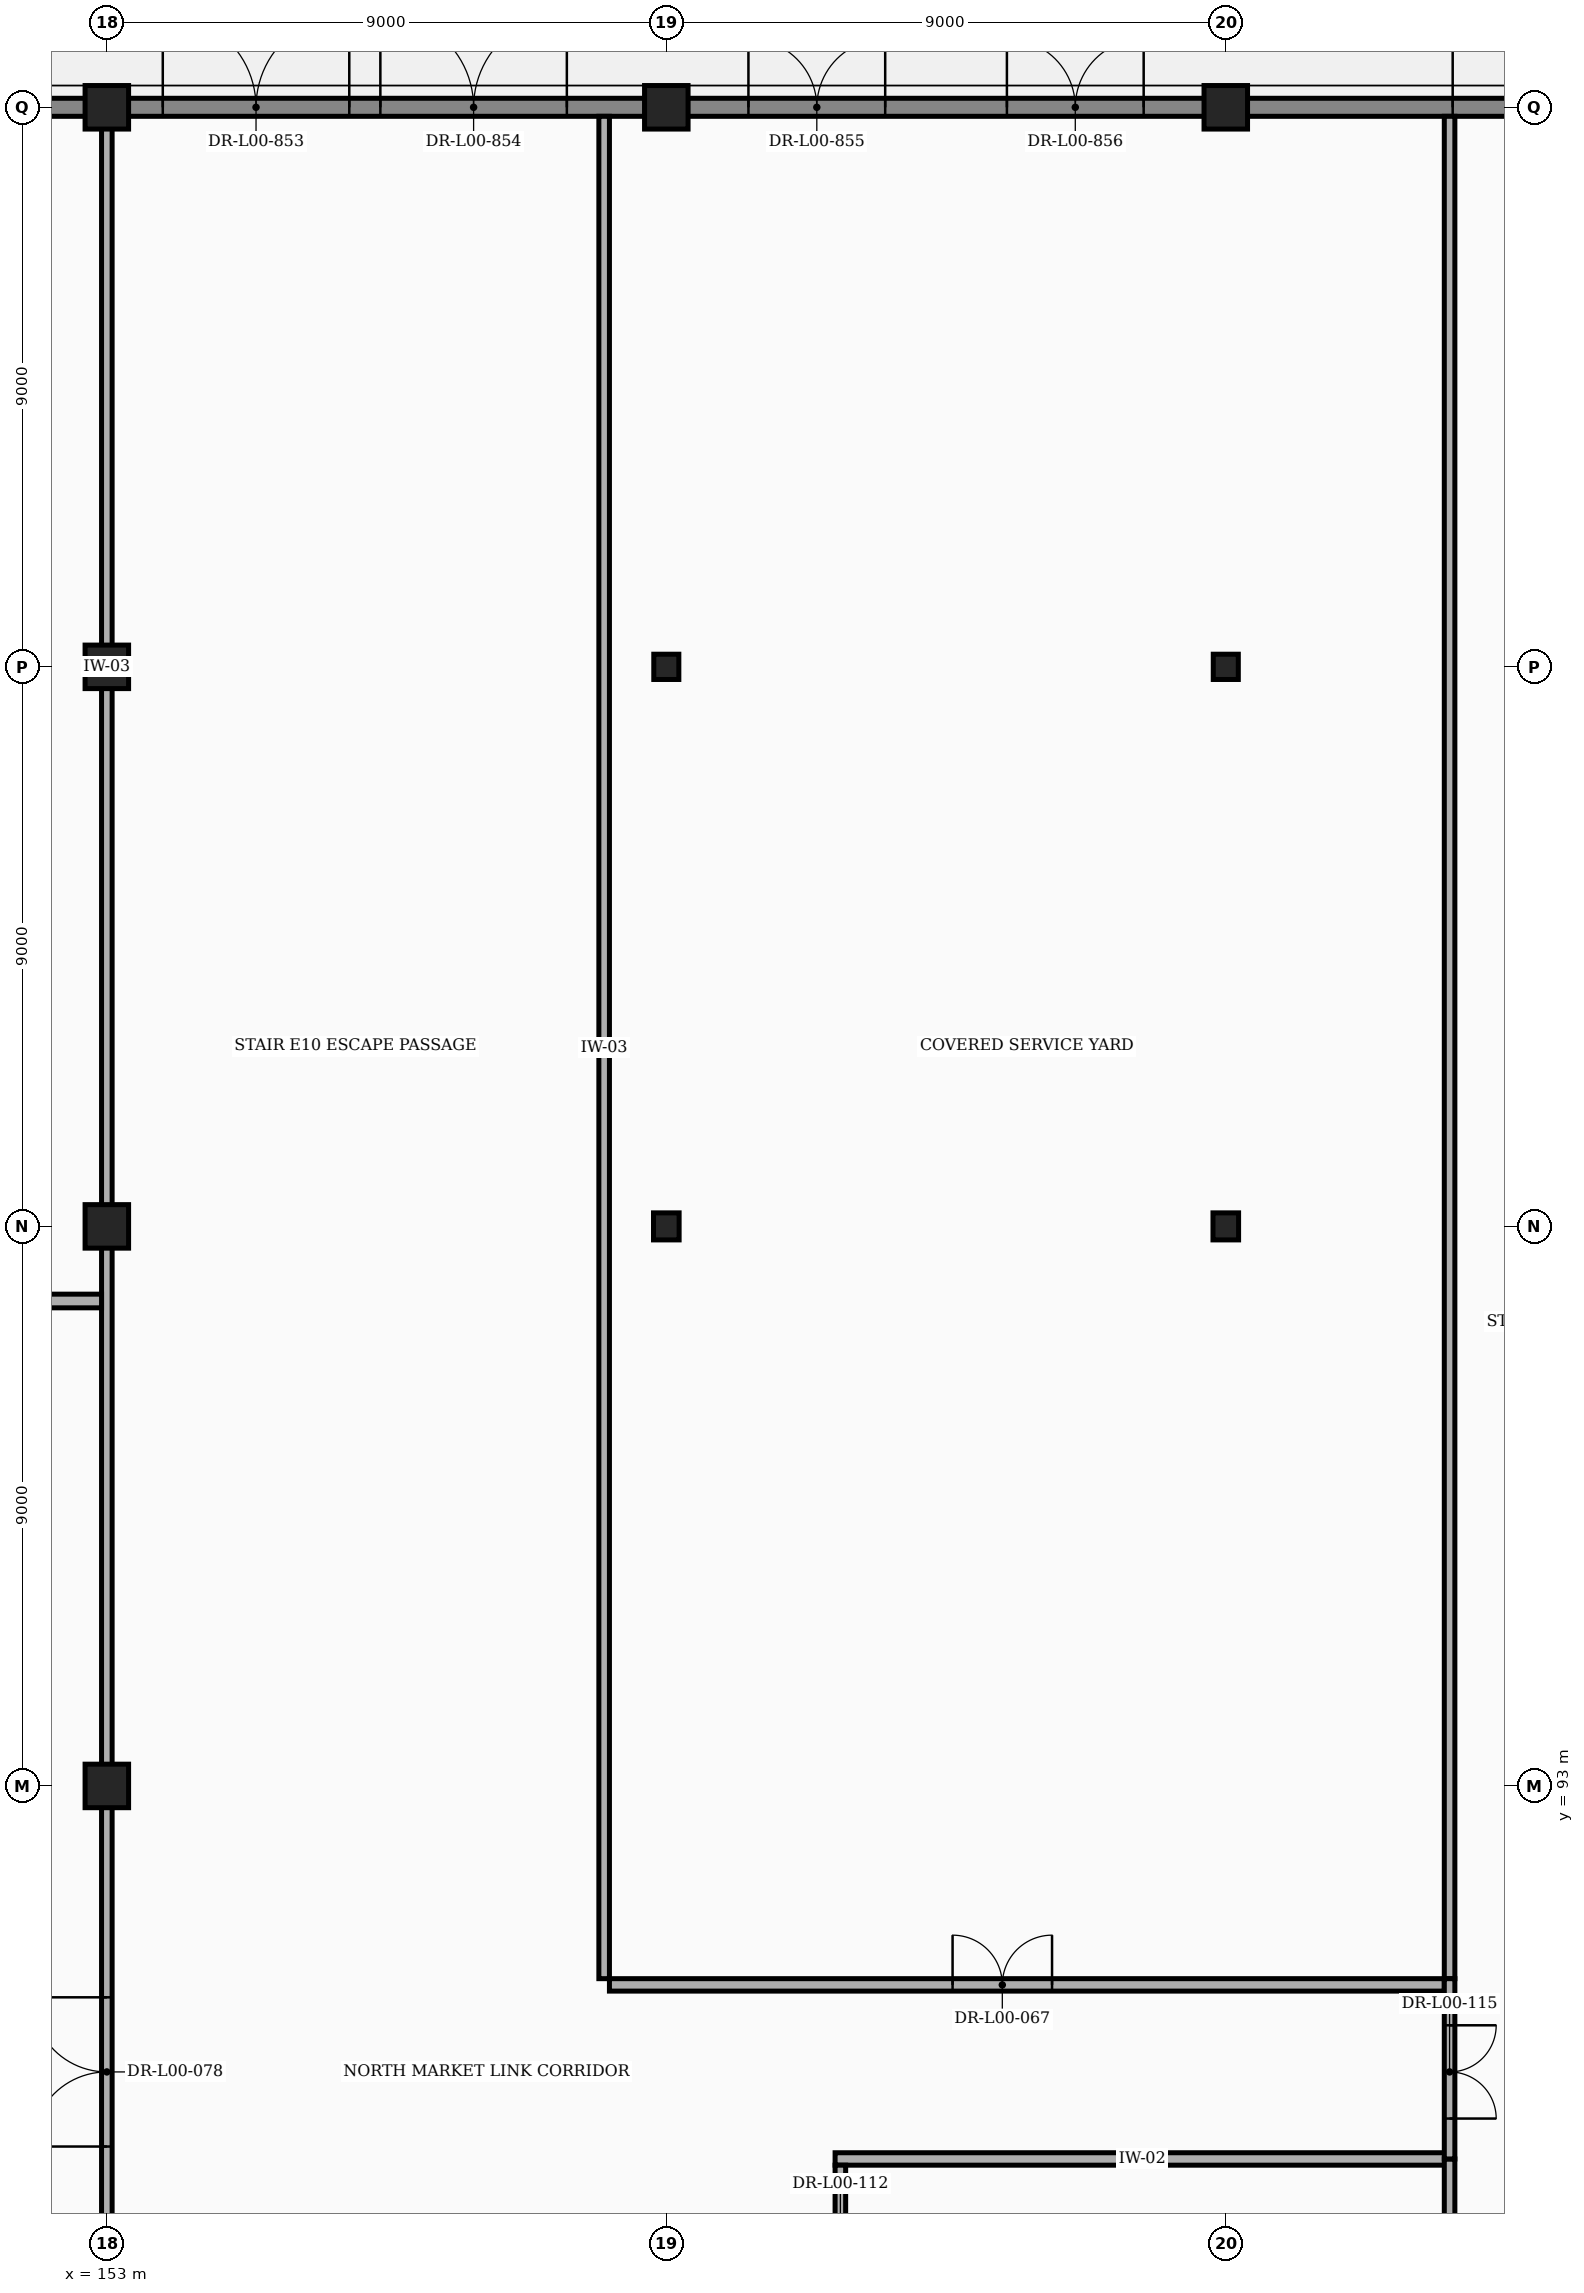
"""IFC4 building model, lengths in metres.
Left out: names, types, materials, properties, quantities, classifications, styles, units other than length and angle.
Written with IfcOpenShell. Run it as: python <this file> out.ifc"""

import sys

from ifc_helpers import new_model, si_unit, direction, frame, frame_2d, origin, origin_2d, place, context, subcontext, project, spatial, rectangle, i_section, extrude, element, fill, save


model = new_model("IFC4")
c1 = context("Model", 3, precision=1e-05, world=origin(), true_north=direction((0.0, 1.0)))
c2 = subcontext(c1, "Body", "Model", "MODEL_VIEW")
j1 = project(units=[si_unit("LENGTHUNIT", "METRE"), si_unit("PLANEANGLEUNIT", "RADIAN")], contexts=[c1])
p1 = place(None, origin())
s1 = spatial("IfcSite", under=j1, at=p1, CompositionType="ELEMENT")
p2 = place(p1, origin())
s2 = spatial("IfcBuilding", under=s1, at=p2, CompositionType="ELEMENT")
p3 = place(p2, origin())
s3 = spatial("IfcBuildingStorey", under=s2, at=p3, CompositionType="ELEMENT", Elevation=0.0)
for number, where, z_axis, x_axis in (
    (1, (153.0, 93.0, 0.0), (0.0, 0.0, 1.0), (1.0, 0.0, 0.0)),
    (2, (153.0, 102.0, 0.0), (0.0, 0.0, 1.0), (1.0, 0.0, 0.0)),
    (3, (153.0, 111.0, 0.0), (0.0, 0.0, 1.0), (1.0, 0.0, 0.0)),
    (4, (153.0, 120.0, 0.0), (0.0, 0.0, 1.0), (1.0, 0.0, 0.0)),
):
    element("IfcColumn", number, at=place(p3, frame(where, z_axis=z_axis, x_axis=x_axis)), inside=s3, PredefinedType="COLUMN", context=c2, shape_type="SweptSolid", body=[
        extrude(rectangle(XDim=0.7, YDim=0.7, at=origin_2d()), origin(), (0.0, 0.0, 1.0), 6.0),
    ])
p4 = place(p3, frame((162.0, 102.0, 0.0), z_axis=(0.0, 0.0, 1.0), x_axis=(1.0, 0.0, 0.0)))
e5 = element("IfcColumn", 5, at=p4, inside=s3, PredefinedType="COLUMN", context=c2, shape_type="SweptSolid", body=[
    extrude(i_section(OverallWidth=0.412, OverallDepth=0.435, WebThickness=0.036, FlangeThickness=0.058, at=origin_2d()), origin(), (0.0, 0.0, 1.0), 6.0),
])
p5 = place(p3, frame((162.0, 111.0, 0.0), z_axis=(0.0, 0.0, 1.0), x_axis=(1.0, 0.0, 0.0)))
e6 = element("IfcColumn", 6, at=p5, inside=s3, PredefinedType="COLUMN", context=c2, shape_type="SweptSolid", body=[
    extrude(i_section(OverallWidth=0.403, OverallDepth=0.406, WebThickness=0.027, FlangeThickness=0.043, at=origin_2d()), origin(), (0.0, 0.0, 1.0), 6.0),
])
p6 = place(p3, frame((162.0, 120.0, 0.0), z_axis=(0.0, 0.0, 1.0), x_axis=(1.0, 0.0, 0.0)))
e7 = element("IfcColumn", 7, at=p6, inside=s3, PredefinedType="COLUMN", context=c2, shape_type="SweptSolid", body=[
    extrude(rectangle(XDim=0.7, YDim=0.7, at=origin_2d()), origin(), (0.0, 0.0, 1.0), 6.0),
])
p7 = place(p3, frame((171.0, 102.0, 0.0), z_axis=(0.0, 0.0, 1.0), x_axis=(1.0, 0.0, 0.0)))
e8 = element("IfcColumn", 8, at=p7, inside=s3, PredefinedType="COLUMN", context=c2, shape_type="SweptSolid", body=[
    extrude(i_section(OverallWidth=0.412, OverallDepth=0.435, WebThickness=0.036, FlangeThickness=0.058, at=origin_2d()), origin(), (0.0, 0.0, 1.0), 6.0),
])
p8 = place(p3, frame((171.0, 111.0, 0.0), z_axis=(0.0, 0.0, 1.0), x_axis=(1.0, 0.0, 0.0)))
e9 = element("IfcColumn", 9, at=p8, inside=s3, PredefinedType="COLUMN", context=c2, shape_type="SweptSolid", body=[
    extrude(i_section(OverallWidth=0.403, OverallDepth=0.406, WebThickness=0.027, FlangeThickness=0.043, at=origin_2d()), origin(), (0.0, 0.0, 1.0), 6.0),
])
p9 = place(p3, frame((171.0, 120.0, 0.0), z_axis=(0.0, 0.0, 1.0), x_axis=(1.0, 0.0, 0.0)))
e10 = element("IfcColumn", 10, at=p9, inside=s3, PredefinedType="COLUMN", context=c2, shape_type="SweptSolid", body=[
    extrude(rectangle(XDim=0.7, YDim=0.7, at=origin_2d()), origin(), (0.0, 0.0, 1.0), 6.0),
])
p10 = place(p3, frame((135.342, 120.0, 0.0), z_axis=(0.0, 0.0, 1.0), x_axis=(1.0, 0.0, 0.0)))
e11 = element("IfcWall", 11, at=p10, inside=s3, PredefinedType="STANDARD", context=c2, shape_type="SweptSolid", body=[
    extrude(rectangle(XDim=17.316, YDim=0.29, at=frame_2d((8.658, 0.0))), origin(), (0.0, 0.0, 1.0), 4.988),
])
p11 = place(p10, frame((1.786, 0.0, 0.0)))
e12 = element("IfcOpeningElement", 12, at=p11, cuts=e11, PredefinedType="OPENING", context=c2, shape_type="SweptSolid", body=[
    extrude(rectangle(XDim=2.2, YDim=2.4, at=frame_2d((1.1, 1.2))), frame((0.0, 0.157, 0.0), z_axis=(0.0, -1.0, 0.0), x_axis=(1.0, 0.0, 0.0)), (0.0, 0.0, 1.0), 0.314),
])
p12 = place(p10, frame((7.558, 0.0, 0.0)))
e13 = element("IfcOpeningElement", 13, at=p12, cuts=e11, PredefinedType="OPENING", context=c2, shape_type="SweptSolid", body=[
    extrude(rectangle(XDim=2.2, YDim=2.4, at=frame_2d((1.1, 1.2))), frame((0.0, 0.157, 0.0), z_axis=(0.0, -1.0, 0.0), x_axis=(1.0, 0.0, 0.0)), (0.0, 0.0, 1.0), 0.314),
])
p13 = place(p10, frame((13.78, 0.0, 0.0)))
e14 = element("IfcOpeningElement", 14, at=p13, cuts=e11, PredefinedType="OPENING", context=c2, shape_type="SweptSolid", body=[
    extrude(rectangle(XDim=2.2, YDim=2.4, at=frame_2d((1.1, 1.2))), frame((0.0, 0.157, 0.0), z_axis=(0.0, -1.0, 0.0), x_axis=(1.0, 0.0, 0.0)), (0.0, 0.0, 1.0), 0.314),
])
p14 = place(p3, frame((153.342, 120.0, 0.0), z_axis=(0.0, 0.0, 1.0), x_axis=(1.0, 0.0, 0.0)))
e15 = element("IfcWall", 15, at=p14, inside=s3, PredefinedType="STANDARD", context=c2, shape_type="SweptSolid", body=[
    extrude(rectangle(XDim=8.316, YDim=0.29, at=frame_2d((4.158, 0.0))), origin(), (0.0, 0.0, 1.0), 5.138),
])
p15 = place(p14, frame((0.558, 0.0, 0.0)))
e16 = element("IfcOpeningElement", 16, at=p15, cuts=e15, PredefinedType="OPENING", context=c2, shape_type="SweptSolid", body=[
    extrude(rectangle(XDim=3.0, YDim=2.4, at=frame_2d((1.5, 1.2))), frame((0.0, 0.157, 0.0), z_axis=(0.0, -1.0, 0.0), x_axis=(1.0, 0.0, 0.0)), (0.0, 0.0, 1.0), 0.314),
])
p16 = place(p14, frame((4.058, 0.0, 0.0)))
e17 = element("IfcOpeningElement", 17, at=p16, cuts=e15, PredefinedType="OPENING", context=c2, shape_type="SweptSolid", body=[
    extrude(rectangle(XDim=3.0, YDim=2.4, at=frame_2d((1.5, 1.2))), frame((0.0, 0.157, 0.0), z_axis=(0.0, -1.0, 0.0), x_axis=(1.0, 0.0, 0.0)), (0.0, 0.0, 1.0), 0.314),
])
p17 = place(p3, frame((162.342, 120.0, 0.0), z_axis=(0.0, 0.0, 1.0), x_axis=(1.0, 0.0, 0.0)))
e18 = element("IfcWall", 18, at=p17, inside=s3, PredefinedType="STANDARD", context=c2, shape_type="SweptSolid", body=[
    extrude(rectangle(XDim=8.316, YDim=0.29, at=frame_2d((4.158, 0.0))), origin(), (0.0, 0.0, 1.0), 5.138),
])
p18 = place(p17, frame((0.979, 0.0, 0.0)))
e19 = element("IfcOpeningElement", 19, at=p18, cuts=e18, PredefinedType="OPENING", context=c2, shape_type="SweptSolid", body=[
    extrude(rectangle(XDim=2.2, YDim=2.4, at=frame_2d((1.1, 1.2))), frame((0.0, 0.157, 0.0), z_axis=(0.0, -1.0, 0.0), x_axis=(1.0, 0.0, 0.0)), (0.0, 0.0, 1.0), 0.314),
])
p19 = place(p17, frame((5.137, 0.0, 0.0)))
e20 = element("IfcOpeningElement", 20, at=p19, cuts=e18, PredefinedType="OPENING", context=c2, shape_type="SweptSolid", body=[
    extrude(rectangle(XDim=2.2, YDim=2.4, at=frame_2d((1.1, 1.2))), frame((0.0, 0.157, 0.0), z_axis=(0.0, -1.0, 0.0), x_axis=(1.0, 0.0, 0.0)), (0.0, 0.0, 1.0), 0.314),
])
p20 = place(p3, frame((171.342, 120.0, 0.0), z_axis=(0.0, 0.0, 1.0), x_axis=(1.0, 0.0, 0.0)))
e21 = element("IfcWall", 21, at=p20, inside=s3, PredefinedType="STANDARD", context=c2, shape_type="SweptSolid", body=[
    extrude(rectangle(XDim=17.316, YDim=0.29, at=frame_2d((8.658, 0.0))), origin(), (0.0, 0.0, 1.0), 4.988),
])
p21 = place(p20, frame((3.308, 0.0, 0.0)))
e22 = element("IfcOpeningElement", 22, at=p21, cuts=e21, PredefinedType="OPENING", context=c2, shape_type="SweptSolid", body=[
    extrude(rectangle(XDim=3.5, YDim=2.4, at=frame_2d((1.75, 1.2))), frame((0.0, 0.157, 0.0), z_axis=(0.0, -1.0, 0.0), x_axis=(1.0, 0.0, 0.0)), (0.0, 0.0, 1.0), 0.314),
])
p22 = place(p20, frame((13.666, 0.0, 0.85)))
e23 = element("IfcOpeningElement", 23, at=p22, cuts=e21, PredefinedType="OPENING", context=c2, shape_type="SweptSolid", body=[
    extrude(rectangle(XDim=3.0, YDim=2.6, at=frame_2d((1.5, 1.3))), frame((0.0, 0.157, 0.0), z_axis=(0.0, -1.0, 0.0), x_axis=(1.0, 0.0, 0.0)), (0.0, 0.0, 1.0), 0.314),
])
p23 = place(p3, frame((164.715, 87.0, 0.0), z_axis=(0.0, 0.0, 1.0), x_axis=(1.0, 0.0, 0.0)))
e24 = element("IfcWall", 24, at=p23, inside=s3, PredefinedType="PARTITIONING", context=c2, shape_type="SweptSolid", body=[
    extrude(rectangle(XDim=9.885, YDim=0.2, at=frame_2d((4.942, 0.0))), origin(), (0.0, 0.0, 1.0), 5.75),
])
p24 = place(p3, frame((161.085, 89.8, 0.0), z_axis=(0.0, 0.0, 1.0), x_axis=(1.0, 0.0, 0.0)))
e25 = element("IfcWall", 25, at=p24, inside=s3, PredefinedType="PARTITIONING", context=c2, shape_type="SweptSolid", body=[
    extrude(rectangle(XDim=13.43, YDim=0.2, at=frame_2d((6.715, 0.0))), origin(), (0.0, 0.0, 1.0), 5.75),
])
p25 = place(p24, frame((5.52, 0.0, 0.0)))
e26 = element("IfcOpeningElement", 26, at=p25, cuts=e25, PredefinedType="OPENING", context=c2, shape_type="SweptSolid", body=[
    extrude(rectangle(XDim=1.6, YDim=2.3, at=frame_2d((0.8, 1.15))), frame((0.0, 0.112, 0.0), z_axis=(0.0, -1.0, 0.0), x_axis=(1.0, 0.0, 0.0)), (0.0, 0.0, 1.0), 0.224),
])
p26 = place(p3, frame((153.0, 84.22, 0.0), z_axis=(0.0, 0.0, 1.0), x_axis=(0.0, 1.0, 0.0)))
e27 = element("IfcWall", 27, at=p26, inside=s3, PredefinedType="PARTITIONING", context=c2, shape_type="SweptSolid", body=[
    extrude(rectangle(XDim=8.56, YDim=0.17, at=frame_2d((4.28, 0.0))), origin(), (0.0, 0.0, 1.0), 5.217),
])
p27 = place(p26, frame((2.98, 0.0, 0.0)))
e28 = element("IfcOpeningElement", 28, at=p27, cuts=e27, PredefinedType="OPENING", context=c2, shape_type="SweptSolid", body=[
    extrude(rectangle(XDim=2.4, YDim=2.2, at=frame_2d((1.2, 1.1))), frame((0.0, 0.097, 0.0), z_axis=(0.0, -1.0, 0.0), x_axis=(1.0, 0.0, 0.0)), (0.0, 0.0, 1.0), 0.194),
])
p28 = place(p3, frame((153.0, 93.22, 0.0), z_axis=(0.0, 0.0, 1.0), x_axis=(0.0, 1.0, 0.0)))
e29 = element("IfcWall", 29, at=p28, inside=s3, PredefinedType="PARTITIONING", context=c2, shape_type="SweptSolid", body=[
    extrude(rectangle(XDim=8.56, YDim=0.17, at=frame_2d((4.28, 0.0))), origin(), (0.0, 0.0, 1.0), 5.217),
])
p29 = place(p3, frame((153.0, 102.22, 0.0), z_axis=(0.0, 0.0, 1.0), x_axis=(0.0, 1.0, 0.0)))
e30 = element("IfcWall", 30, at=p29, inside=s3, PredefinedType="PARTITIONING", context=c2, shape_type="SweptSolid", body=[
    extrude(rectangle(XDim=17.56, YDim=0.17, at=frame_2d((8.78, 0.0))), origin(), (0.0, 0.0, 1.0), 5.217),
])
p30 = place(p3, frame((147.06, 100.8, 0.0), z_axis=(0.0, 0.0, 1.0), x_axis=(1.0, 0.0, 0.0)))
e31 = element("IfcWall", 31, at=p30, inside=s3, PredefinedType="PARTITIONING", context=c2, shape_type="SweptSolid", body=[
    extrude(rectangle(XDim=5.855, YDim=0.22, at=frame_2d((2.927, 0.0))), origin(), (0.0, 0.0, 1.0), 5.75),
])
p31 = place(p3, frame((174.6, 80.76, 0.0), z_axis=(0.0, 0.0, 1.0), x_axis=(0.0, 1.0, 0.0)))
e32 = element("IfcWall", 32, at=p31, inside=s3, PredefinedType="PARTITIONING", context=c2, shape_type="SweptSolid", body=[
    extrude(rectangle(XDim=6.24, YDim=0.17, at=frame_2d((3.12, 0.0))), origin(), (0.0, 0.0, 1.0), 5.75),
])
for number, where, z_axis, x_axis in (
    (33, (161.0, 89.9, 0.0), (0.0, 0.0, 1.0), (0.0, 1.0, 0.0)),
    (34, (174.6, 89.9, 0.0), (0.0, 0.0, 1.0), (0.0, 1.0, 0.0)),
):
    element("IfcWall", number, at=place(p3, frame(where, z_axis=z_axis, x_axis=x_axis)), inside=s3, PredefinedType="PARTITIONING", context=c2, shape_type="SweptSolid", body=[
        extrude(rectangle(XDim=29.955, YDim=0.17, at=frame_2d((14.978, 0.0))), origin(), (0.0, 0.0, 1.0), 5.75),
    ])
p32 = place(p3, frame((164.8, 63.1, 0.0), z_axis=(0.0, 0.0, 1.0), x_axis=(0.0, 1.0, 0.0)))
e35 = element("IfcWall", 35, at=p32, inside=s3, PredefinedType="PARTITIONING", context=c2, shape_type="SweptSolid", body=[
    extrude(rectangle(XDim=23.8, YDim=0.17, at=frame_2d((11.9, 0.0))), origin(), (0.0, 0.0, 1.0), 5.75),
])
p33 = place(p32, frame((21.83, 0.0, 0.0)))
e36 = element("IfcOpeningElement", 36, at=p33, cuts=e35, PredefinedType="OPENING", context=c2, shape_type="SweptSolid", body=[
    extrude(rectangle(XDim=1.15, YDim=2.15, at=frame_2d((0.575, 1.075))), frame((0.0, 0.097, 0.0), z_axis=(0.0, -1.0, 0.0), x_axis=(1.0, 0.0, 0.0)), (0.0, 0.0, 1.0), 0.194),
])
p34 = place(p3, frame((174.6, 87.0, 0.0), z_axis=(0.0, 0.0, 1.0), x_axis=(0.0, 1.0, 0.0)))
e37 = element("IfcWall", 37, at=p34, inside=s3, PredefinedType="PARTITIONING", context=c2, shape_type="SweptSolid", body=[
    extrude(rectangle(XDim=2.9, YDim=0.17, at=frame_2d((1.45, 0.0))), origin(), (0.0, 0.0, 1.0), 5.75),
])
p35 = place(p34, frame((0.65, 0.0, 0.0)))
e38 = element("IfcOpeningElement", 38, at=p35, cuts=e37, PredefinedType="OPENING", context=c2, shape_type="SweptSolid", body=[
    extrude(rectangle(XDim=1.5, YDim=2.2, at=frame_2d((0.75, 1.1))), frame((0.0, 0.097, 0.0), z_axis=(0.0, -1.0, 0.0), x_axis=(1.0, 0.0, 0.0)), (0.0, 0.0, 1.0), 0.194),
])
p36 = place(p15, origin())
e39 = element("IfcDoor", 39, at=p36, inside=s3, OperationType="DOUBLE_DOOR_SINGLE_SWING", PredefinedType="DOOR", context=c2, shape_type="SweptSolid", body=[
    extrude(rectangle(XDim=3.0, YDim=2.4, at=frame_2d((1.5, 1.2))), frame((0.0, 0.025, 0.0), z_axis=(0.0, -1.0, 0.0), x_axis=(1.0, 0.0, 0.0)), (0.0, 0.0, 1.0), 0.05),
])
fill(e16, e39)
p37 = place(p16, origin())
e40 = element("IfcDoor", 40, at=p37, inside=s3, OperationType="DOUBLE_DOOR_SINGLE_SWING", PredefinedType="DOOR", context=c2, shape_type="SweptSolid", body=[
    extrude(rectangle(XDim=3.0, YDim=2.4, at=frame_2d((1.5, 1.2))), frame((0.0, 0.025, 0.0), z_axis=(0.0, -1.0, 0.0), x_axis=(1.0, 0.0, 0.0)), (0.0, 0.0, 1.0), 0.05),
])
fill(e17, e40)
p38 = place(p18, origin())
e41 = element("IfcDoor", 41, at=p38, inside=s3, OperationType="DOUBLE_DOOR_SINGLE_SWING", PredefinedType="DOOR", context=c2, shape_type="SweptSolid", body=[
    extrude(rectangle(XDim=2.2, YDim=2.4, at=frame_2d((1.1, 1.2))), frame((0.0, 0.025, 0.0), z_axis=(0.0, -1.0, 0.0), x_axis=(1.0, 0.0, 0.0)), (0.0, 0.0, 1.0), 0.05),
])
fill(e19, e41)
p39 = place(p19, origin())
e42 = element("IfcDoor", 42, at=p39, inside=s3, OperationType="DOUBLE_DOOR_SINGLE_SWING", PredefinedType="DOOR", context=c2, shape_type="SweptSolid", body=[
    extrude(rectangle(XDim=2.2, YDim=2.4, at=frame_2d((1.1, 1.2))), frame((0.0, 0.025, 0.0), z_axis=(0.0, -1.0, 0.0), x_axis=(1.0, 0.0, 0.0)), (0.0, 0.0, 1.0), 0.05),
])
fill(e20, e42)
p40 = place(p21, origin())
e43 = element("IfcDoor", 43, at=p40, inside=s3, OperationType="DOUBLE_DOOR_SINGLE_SWING", PredefinedType="DOOR", context=c2, shape_type="SweptSolid", body=[
    extrude(rectangle(XDim=3.5, YDim=2.4, at=frame_2d((1.75, 1.2))), frame((0.0, 0.025, 0.0), z_axis=(0.0, -1.0, 0.0), x_axis=(1.0, 0.0, 0.0)), (0.0, 0.0, 1.0), 0.05),
])
fill(e22, e43)
p41 = place(p25, origin())
e44 = element("IfcDoor", 44, at=p41, inside=s3, OperationType="DOUBLE_DOOR_SINGLE_SWING", PredefinedType="DOOR", context=c2, shape_type="SweptSolid", body=[
    extrude(rectangle(XDim=1.6, YDim=2.3, at=frame_2d((0.8, 1.15))), frame((0.0, 0.025, 0.0), z_axis=(0.0, -1.0, 0.0), x_axis=(1.0, 0.0, 0.0)), (0.0, 0.0, 1.0), 0.05),
])
fill(e26, e44)
p42 = place(p27, origin())
e45 = element("IfcDoor", 45, at=p42, inside=s3, OperationType="DOUBLE_DOOR_SINGLE_SWING", PredefinedType="DOOR", context=c2, shape_type="SweptSolid", body=[
    extrude(rectangle(XDim=2.4, YDim=2.2, at=frame_2d((1.2, 1.1))), frame((0.0, 0.025, 0.0), z_axis=(0.0, -1.0, 0.0), x_axis=(1.0, 0.0, 0.0)), (0.0, 0.0, 1.0), 0.05),
])
fill(e28, e45)
p43 = place(p35, frame((1.5, 0.0, 0.0), z_axis=(0.0, 0.0, 1.0), x_axis=(-1.0, 0.0, 0.0)))
e46 = element("IfcDoor", 46, at=p43, inside=s3, OperationType="DOUBLE_DOOR_SINGLE_SWING", PredefinedType="DOOR", context=c2, shape_type="SweptSolid", body=[
    extrude(rectangle(XDim=1.5, YDim=2.2, at=frame_2d((0.75, 1.1))), frame((0.0, 0.025, 0.0), z_axis=(0.0, -1.0, 0.0), x_axis=(1.0, 0.0, 0.0)), (0.0, 0.0, 1.0), 0.05),
])
fill(e38, e46)
save(model, sys.argv[1])
